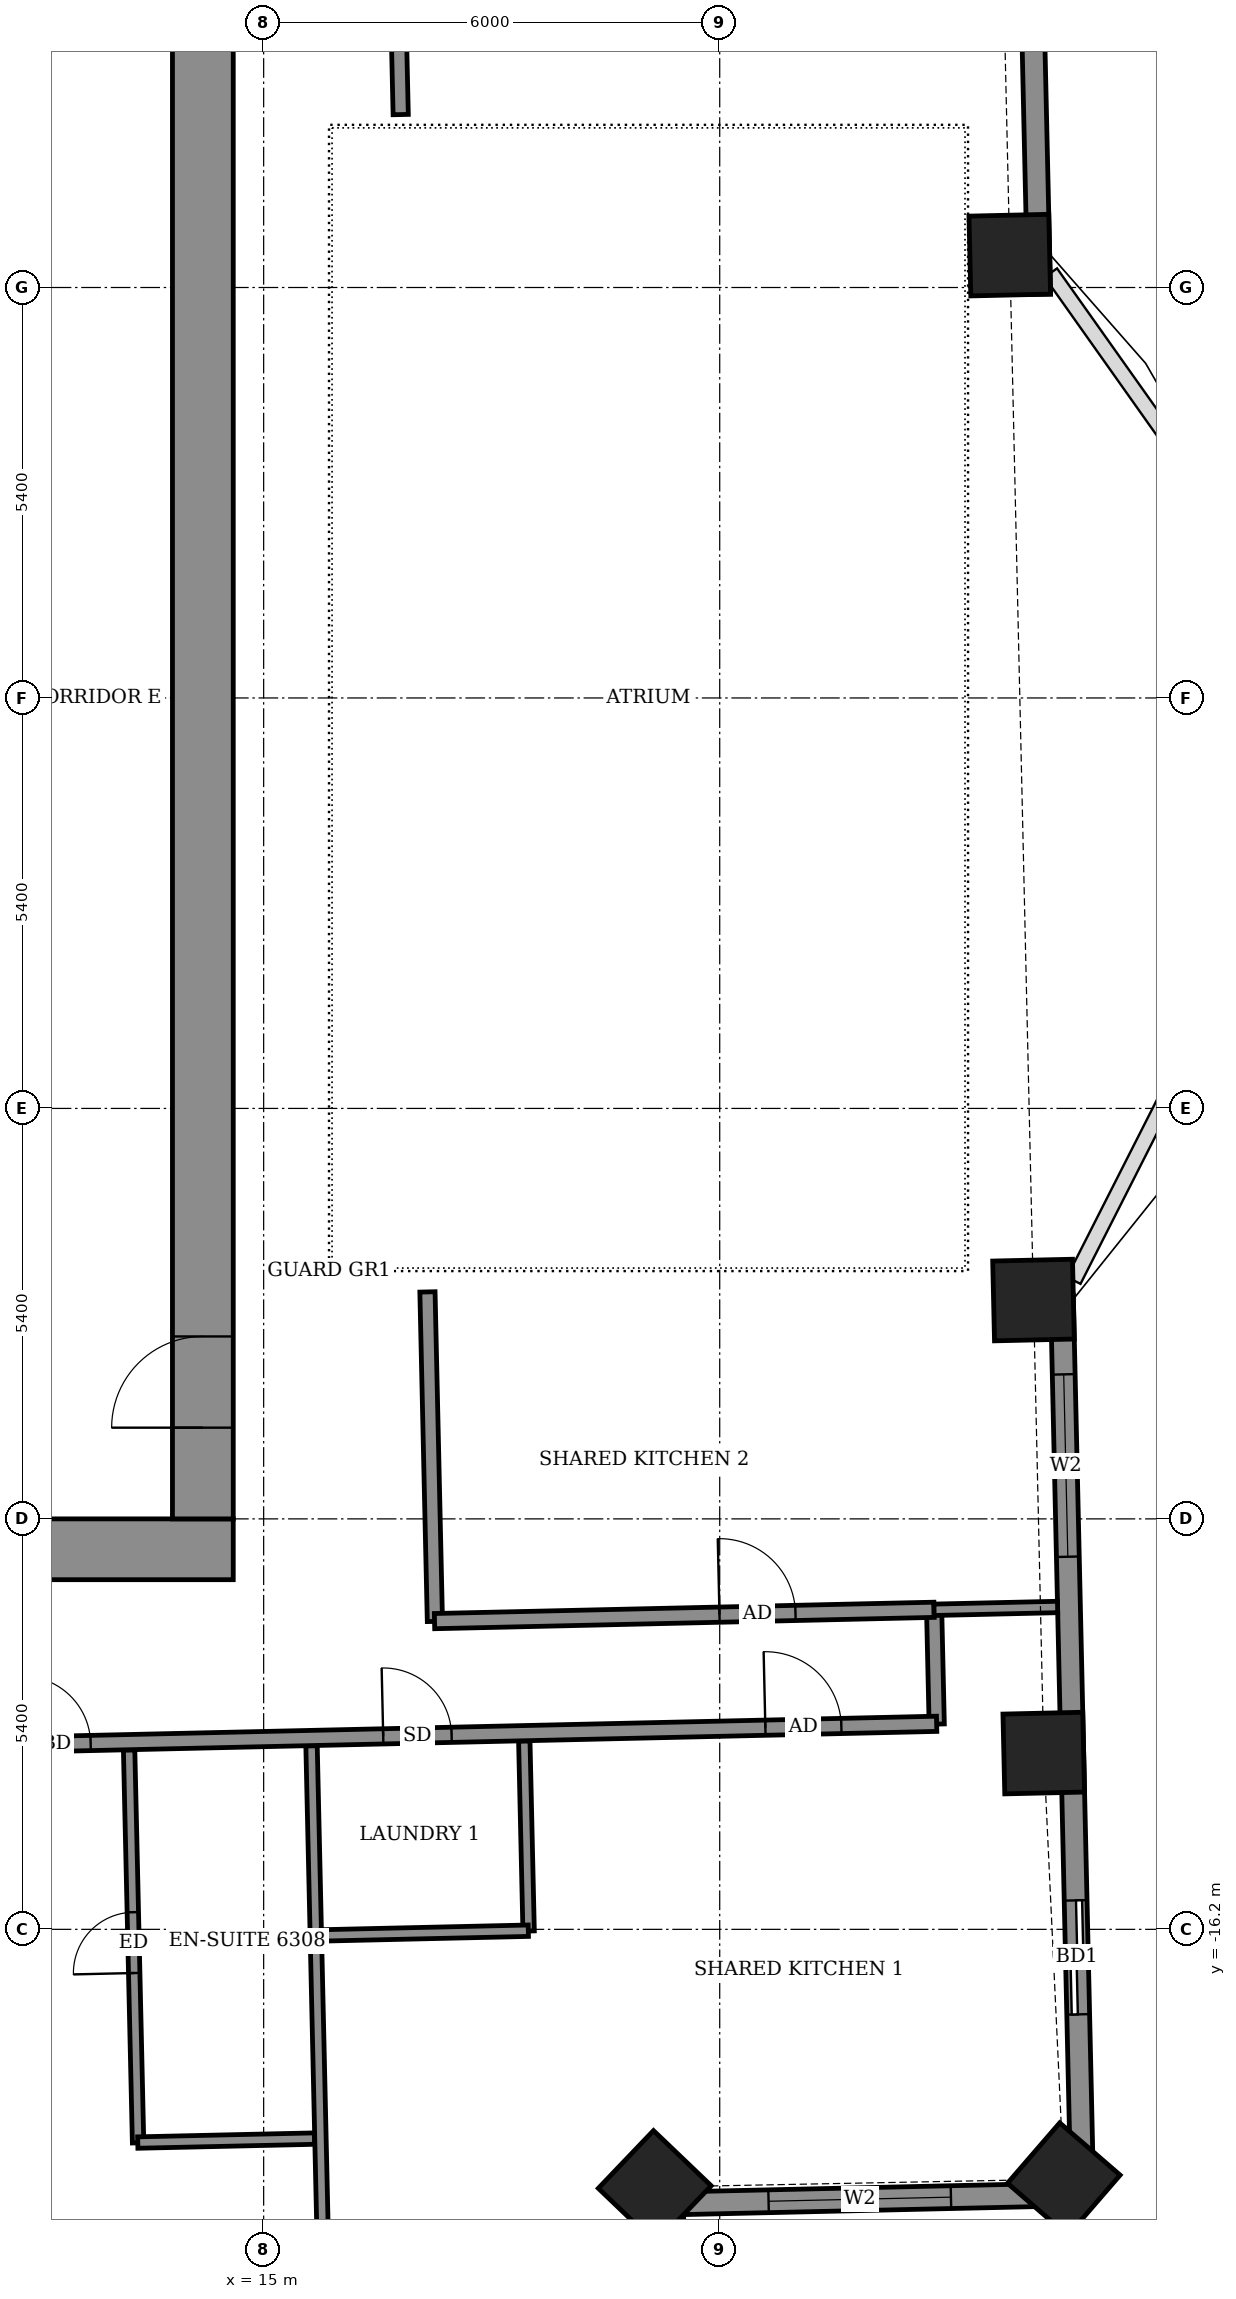
"""IFC4 building model, lengths in metres.
Left out: names, types, materials, properties, quantities, classifications, styles, units other than length and angle.
Written with IfcOpenShell. Run it as: python <this file> out.ifc"""

import sys

from ifc_helpers import new_model, si_unit, direction, frame, frame_2d, origin, origin_2d, place, context, subcontext, project, spatial, rectangle, extrude, element, fill, save


model = new_model("IFC4")
c1 = context("Model", 3, precision=1e-05, world=origin(), true_north=direction((0.0, 1.0)))
c2 = subcontext(c1, "Body", "Model", "MODEL_VIEW")
j1 = project(units=[si_unit("LENGTHUNIT", "METRE"), si_unit("PLANEANGLEUNIT", "RADIAN")], contexts=[c1])
p1 = place(None, origin())
s1 = spatial("IfcSite", under=j1, at=p1, CompositionType="ELEMENT")
p2 = place(p1, origin())
s2 = spatial("IfcBuilding", under=s1, at=p2, CompositionType="ELEMENT")
p3 = place(p2, frame((0.0, 0.0, 249.1)))
s3 = spatial("IfcBuildingStorey", under=s2, at=p3, CompositionType="ELEMENT", Elevation=249.1)
for number, where, z_axis, x_axis in (
    (1, (20.146, -19.59, -0.55), (0.0, 0.0, 1.0), (0.691, 0.723, 0.0)),
    (2, (25.527, -19.487, -0.55), (0.0, 0.0, 1.0), (0.654, 0.756, 0.0)),
    (3, (25.263, -13.881, -0.55), (0.0, 0.0, 1.0), (-0.023, 1.0, 0.0)),
    (4, (25.128, -7.921, -0.55), (0.0, 0.0, 1.0), (-0.023, 1.0, 0.0)),
    (5, (24.816, 5.826, -0.55), (0.0, 0.0, 1.0), (-0.023, 1.0, 0.0)),
):
    element("IfcColumn", number, at=place(p3, frame(where, z_axis=z_axis, x_axis=x_axis)), inside=s3, PredefinedType="COLUMN", context=c2, shape_type="SweptSolid", body=[
        extrude(rectangle(XDim=1.05, YDim=1.05, at=origin_2d()), origin(), (0.0, 0.0, 1.0), 3.6),
    ])
p4 = place(p3, frame((25.77, -19.684, 0.0), z_axis=(0.0, 0.0, 1.0), x_axis=(-0.022659525999, 0.999743239978, 0.0)))
e6 = element("IfcWall", 6, at=p4, inside=s3, PredefinedType="SOLIDWALL", context=c2, shape_type="SweptSolid", body=[
    extrude(rectangle(XDim=11.83, YDim=0.3, at=frame_2d((5.915, 0.0))), origin(), (0.0, 0.0, 1.0), 2.55),
])
p5 = place(p4, frame((2.366, 0.0, 0.0)))
e7 = element("IfcOpeningElement", 7, at=p5, cuts=e6, PredefinedType="OPENING", context=c2, shape_type="SweptSolid", body=[
    extrude(rectangle(XDim=1.5, YDim=2.4, at=frame_2d((0.75, 1.2))), frame((0.0, 0.16, 0.0), z_axis=(0.0, -1.0, 0.0), x_axis=(1.0, 0.0, 0.0)), (0.0, 0.0, 1.0), 0.32),
])
p6 = place(p4, frame((8.388, 0.0, 0.9)))
e8 = element("IfcOpeningElement", 8, at=p6, cuts=e6, PredefinedType="OPENING", context=c2, shape_type="SweptSolid", body=[
    extrude(rectangle(XDim=2.4, YDim=1.5, at=frame_2d((1.2, 0.75))), frame((0.0, 0.16, 0.0), z_axis=(0.0, -1.0, 0.0), x_axis=(1.0, 0.0, 0.0)), (0.0, 0.0, 1.0), 0.32),
])
p7 = place(p3, frame((25.203, 5.31, 0.0), z_axis=(0.0, 0.0, 1.0), x_axis=(-0.022708061432, 0.999742138727, 0.0)))
e9 = element("IfcWall", 9, at=p7, inside=s3, PredefinedType="SOLIDWALL", context=c2, shape_type="SweptSolid", body=[
    extrude(rectangle(XDim=13.299, YDim=0.3, at=frame_2d((6.65, 0.0))), origin(), (0.0, 0.0, 1.0), 2.55),
])
p8 = place(p7, frame((3.986, 0.0, 0.0)))
e10 = element("IfcOpeningElement", 10, at=p8, cuts=e9, PredefinedType="OPENING", context=c2, shape_type="SweptSolid", body=[
    extrude(rectangle(XDim=1.5, YDim=2.4, at=frame_2d((0.75, 1.2))), frame((0.0, 0.16, 0.0), z_axis=(0.0, -1.0, 0.0), x_axis=(1.0, 0.0, 0.0)), (0.0, 0.0, 1.0), 0.32),
])
p9 = place(p7, frame((9.013, 0.0, 0.9)))
e11 = element("IfcOpeningElement", 11, at=p9, cuts=e9, PredefinedType="OPENING", context=c2, shape_type="SweptSolid", body=[
    extrude(rectangle(XDim=2.4, YDim=1.5, at=frame_2d((1.2, 0.75))), frame((0.0, 0.16, 0.0), z_axis=(0.0, -1.0, 0.0), x_axis=(1.0, 0.0, 0.0)), (0.0, 0.0, 1.0), 0.32),
])
p10 = place(p3, frame((20.494, -25.205, 0.0), z_axis=(0.0, 0.0, 1.0), x_axis=(-0.022675486817, 0.999742878093, 0.0)))
e12 = element("IfcWall", 12, at=p10, inside=s3, PredefinedType="SOLIDWALL", context=c2, shape_type="SweptSolid", body=[
    extrude(rectangle(XDim=5.556, YDim=0.3, at=frame_2d((2.778, 0.0))), origin(), (0.0, 0.0, 1.0), 2.55),
])
p11 = place(p10, frame((1.743, 0.0, 0.9)))
e13 = element("IfcOpeningElement", 13, at=p11, cuts=e12, PredefinedType="OPENING", context=c2, shape_type="SweptSolid", body=[
    extrude(rectangle(XDim=2.4, YDim=1.5, at=frame_2d((1.2, 0.75))), frame((0.0, 0.16, 0.0), z_axis=(0.0, -1.0, 0.0), x_axis=(1.0, 0.0, 0.0)), (0.0, 0.0, 1.0), 0.32),
])
p12 = place(p3, frame((20.372, -19.806, 0.0), z_axis=(0.0, 0.0, 1.0), x_axis=(0.999745417973, 0.02256322766, 0.0)))
e14 = element("IfcWall", 14, at=p12, inside=s3, PredefinedType="SOLIDWALL", context=c2, shape_type="SweptSolid", body=[
    extrude(rectangle(XDim=5.399, YDim=0.3, at=frame_2d((2.7, 0.0))), origin(), (0.0, 0.0, 1.0), 2.55),
])
p13 = place(p12, frame((1.271, 0.0, 0.9)))
e15 = element("IfcOpeningElement", 15, at=p13, cuts=e14, PredefinedType="OPENING", context=c2, shape_type="SweptSolid", body=[
    extrude(rectangle(XDim=2.4, YDim=1.5, at=frame_2d((1.2, 0.75))), frame((0.0, 0.16, 0.0), z_axis=(0.0, -1.0, 0.0), x_axis=(1.0, 0.0, 0.0)), (0.0, 0.0, 1.0), 0.32),
])
p14 = place(p3, frame((15.888, -25.159, 0.0), z_axis=(0.0, 0.0, 1.0), x_axis=(-0.022684355347, 0.999742676904, 0.0)))
e16 = element("IfcWall", 16, at=p14, inside=s3, PredefinedType="PARTITIONING", context=c2, shape_type="SweptSolid", body=[
    extrude(rectangle(XDim=11.376, YDim=0.15, at=frame_2d((5.688, 0.0))), origin(), (0.0, 0.0, 1.0), 2.55),
])
p15 = place(p3, frame((13.348, -19.009, 0.0), z_axis=(0.0, 0.0, 1.0), x_axis=(-0.022811522835, 0.999739783357, 0.0)))
e17 = element("IfcWall", 17, at=p15, inside=s3, PredefinedType="PARTITIONING", context=c2, shape_type="SweptSolid", body=[
    extrude(rectangle(XDim=5.169, YDim=0.15, at=frame_2d((2.585, 0.0))), origin(), (0.0, 0.0, 1.0), 3.05),
])
p16 = place(p15, frame((2.235, 0.0, 0.0)))
e18 = element("IfcOpeningElement", 18, at=p16, cuts=e17, PredefinedType="OPENING", context=c2, shape_type="SweptSolid", body=[
    extrude(rectangle(XDim=0.8, YDim=2.1, at=frame_2d((0.4, 1.05))), frame((0.0, 0.085, 0.0), z_axis=(0.0, -1.0, 0.0), x_axis=(1.0, 0.0, 0.0)), (0.0, 0.0, 1.0), 0.17),
])
p17 = place(p3, frame((13.344, -19.005, 0.0), z_axis=(0.0, 0.0, 1.0), x_axis=(0.999749744571, 0.022370700241, 0.0)))
e19 = element("IfcWall", 19, at=p17, inside=s3, PredefinedType="PARTITIONING", context=c2, shape_type="SweptSolid", body=[
    extrude(rectangle(XDim=2.324, YDim=0.15, at=frame_2d((1.162, 0.0))), origin(), (0.0, 0.0, 1.0), 3.05),
])
p18 = place(p3, frame((18.486, -16.222, 0.0), z_axis=(0.0, 0.0, 1.0), x_axis=(-0.022854521249, 0.999738801317, 0.0)))
e20 = element("IfcWall", 20, at=p18, inside=s3, PredefinedType="PARTITIONING", context=c2, shape_type="SweptSolid", body=[
    extrude(rectangle(XDim=2.5, YDim=0.15, at=frame_2d((1.25, 0.0))), origin(), (0.0, 0.0, 1.0), 3.05),
])
p19 = place(p3, frame((15.757, -16.28, 0.0), z_axis=(0.0, 0.0, 1.0), x_axis=(0.99974114142, 0.022751926344, 0.0)))
e21 = element("IfcWall", 21, at=p19, inside=s3, PredefinedType="PARTITIONING", context=c2, shape_type="SweptSolid", body=[
    extrude(rectangle(XDim=2.726, YDim=0.15, at=frame_2d((1.363, 0.0))), origin(), (0.0, 0.0, 1.0), 3.05),
])
p20 = place(p3, frame((23.855, -13.5, 0.0), z_axis=(0.0, 0.0, 1.0), x_axis=(-0.022617910375, 0.999744182344, 0.0)))
e22 = element("IfcWall", 22, at=p20, inside=s3, PredefinedType="PARTITIONING", context=c2, shape_type="SweptSolid", body=[
    extrude(rectangle(XDim=1.5, YDim=0.2, at=frame_2d((0.75, 0.0))), origin(), (0.0, 0.0, 1.0), 3.05),
])
p21 = place(p3, frame((-27.016, -14.65, 0.0), z_axis=(0.0, 0.0, 1.0), x_axis=(0.999742874861, 0.022675629315, 0.0)))
e23 = element("IfcWall", 23, at=p21, inside=s3, PredefinedType="PARTITIONING", context=c2, shape_type="SweptSolid", body=[
    extrude(rectangle(XDim=50.883, YDim=0.2, at=frame_2d((25.442, 0.0))), origin(), (0.0, 0.0, 1.0), 3.05),
])
p22 = place(p21, frame((1.575, 0.0, 0.0)))
e24 = element("IfcOpeningElement", 24, at=p22, cuts=e23, PredefinedType="OPENING", context=c2, shape_type="SweptSolid", body=[
    extrude(rectangle(XDim=1.0, YDim=2.1, at=frame_2d((0.5, 1.05))), frame((0.0, 0.11, 0.0), z_axis=(0.0, -1.0, 0.0), x_axis=(1.0, 0.0, 0.0)), (0.0, 0.0, 1.0), 0.22),
])
p23 = place(p21, frame((6.4, 0.0, 0.0)))
e25 = element("IfcOpeningElement", 25, at=p23, cuts=e23, PredefinedType="OPENING", context=c2, shape_type="SweptSolid", body=[
    extrude(rectangle(XDim=0.9, YDim=2.1, at=frame_2d((0.45, 1.05))), frame((0.0, 0.11, 0.0), z_axis=(0.0, -1.0, 0.0), x_axis=(1.0, 0.0, 0.0)), (0.0, 0.0, 1.0), 0.22),
])
p24 = place(p21, frame((11.025, 0.0, 0.0)))
e26 = element("IfcOpeningElement", 26, at=p24, cuts=e23, PredefinedType="OPENING", context=c2, shape_type="SweptSolid", body=[
    extrude(rectangle(XDim=0.9, YDim=2.1, at=frame_2d((0.45, 1.05))), frame((0.0, 0.11, 0.0), z_axis=(0.0, -1.0, 0.0), x_axis=(1.0, 0.0, 0.0)), (0.0, 0.0, 1.0), 0.22),
])
p25 = place(p21, frame((12.925, 0.0, 0.0)))
e27 = element("IfcOpeningElement", 27, at=p25, cuts=e23, PredefinedType="OPENING", context=c2, shape_type="SweptSolid", body=[
    extrude(rectangle(XDim=0.9, YDim=2.1, at=frame_2d((0.45, 1.05))), frame((0.0, 0.11, 0.0), z_axis=(0.0, -1.0, 0.0), x_axis=(1.0, 0.0, 0.0)), (0.0, 0.0, 1.0), 0.22),
])
p26 = place(p21, frame((19.65, 0.0, 0.0)))
e28 = element("IfcOpeningElement", 28, at=p26, cuts=e23, PredefinedType="OPENING", context=c2, shape_type="SweptSolid", body=[
    extrude(rectangle(XDim=0.9, YDim=2.1, at=frame_2d((0.45, 1.05))), frame((0.0, 0.11, 0.0), z_axis=(0.0, -1.0, 0.0), x_axis=(1.0, 0.0, 0.0)), (0.0, 0.0, 1.0), 0.22),
])
p27 = place(p21, frame((21.575, 0.0, 0.0)))
e29 = element("IfcOpeningElement", 29, at=p27, cuts=e23, PredefinedType="OPENING", context=c2, shape_type="SweptSolid", body=[
    extrude(rectangle(XDim=0.9, YDim=2.1, at=frame_2d((0.45, 1.05))), frame((0.0, 0.11, 0.0), z_axis=(0.0, -1.0, 0.0), x_axis=(1.0, 0.0, 0.0)), (0.0, 0.0, 1.0), 0.22),
])
p28 = place(p21, frame((28.25, 0.0, 0.0)))
e30 = element("IfcOpeningElement", 30, at=p28, cuts=e23, PredefinedType="OPENING", context=c2, shape_type="SweptSolid", body=[
    extrude(rectangle(XDim=0.9, YDim=2.1, at=frame_2d((0.45, 1.05))), frame((0.0, 0.11, 0.0), z_axis=(0.0, -1.0, 0.0), x_axis=(1.0, 0.0, 0.0)), (0.0, 0.0, 1.0), 0.22),
])
p29 = place(p21, frame((30.125, 0.0, 0.0)))
e31 = element("IfcOpeningElement", 31, at=p29, cuts=e23, PredefinedType="OPENING", context=c2, shape_type="SweptSolid", body=[
    extrude(rectangle(XDim=0.9, YDim=2.1, at=frame_2d((0.45, 1.05))), frame((0.0, 0.11, 0.0), z_axis=(0.0, -1.0, 0.0), x_axis=(1.0, 0.0, 0.0)), (0.0, 0.0, 1.0), 0.22),
])
p30 = place(p21, frame((36.9, 0.0, 0.0)))
e32 = element("IfcOpeningElement", 32, at=p30, cuts=e23, PredefinedType="OPENING", context=c2, shape_type="SweptSolid", body=[
    extrude(rectangle(XDim=0.9, YDim=2.1, at=frame_2d((0.45, 1.05))), frame((0.0, 0.11, 0.0), z_axis=(0.0, -1.0, 0.0), x_axis=(1.0, 0.0, 0.0)), (0.0, 0.0, 1.0), 0.22),
])
p31 = place(p21, frame((38.85, 0.0, 0.0)))
e33 = element("IfcOpeningElement", 33, at=p31, cuts=e23, PredefinedType="OPENING", context=c2, shape_type="SweptSolid", body=[
    extrude(rectangle(XDim=0.9, YDim=2.1, at=frame_2d((0.45, 1.05))), frame((0.0, 0.11, 0.0), z_axis=(0.0, -1.0, 0.0), x_axis=(1.0, 0.0, 0.0)), (0.0, 0.0, 1.0), 0.22),
])
p32 = place(p21, frame((48.629, 0.0, 0.0)))
e34 = element("IfcOpeningElement", 34, at=p32, cuts=e23, PredefinedType="OPENING", context=c2, shape_type="SweptSolid", body=[
    extrude(rectangle(XDim=1.0, YDim=2.1, at=frame_2d((0.5, 1.05))), frame((0.0, 0.11, 0.0), z_axis=(0.0, -1.0, 0.0), x_axis=(1.0, 0.0, 0.0)), (0.0, 0.0, 1.0), 0.22),
])
p33 = place(p21, frame((43.6, 0.0, 0.0)))
e35 = element("IfcOpeningElement", 35, at=p33, cuts=e23, PredefinedType="OPENING", context=c2, shape_type="SweptSolid", body=[
    extrude(rectangle(XDim=0.9, YDim=2.1, at=frame_2d((0.45, 1.05))), frame((0.0, 0.11, 0.0), z_axis=(0.0, -1.0, 0.0), x_axis=(1.0, 0.0, 0.0)), (0.0, 0.0, 1.0), 0.22),
])
p34 = place(p3, frame((17.253, -12.149, 0.0), z_axis=(0.0, 0.0, 1.0), x_axis=(-0.022578158225, 0.999745080894, 0.0)))
e36 = element("IfcWall", 36, at=p34, inside=s3, PredefinedType="PARTITIONING", context=c2, shape_type="SweptSolid", body=[
    extrude(rectangle(XDim=4.336, YDim=0.2, at=frame_2d((2.168, 0.0))), origin(), (0.0, 0.0, 1.0), 3.05),
])
p35 = place(p3, frame((17.248, -12.145, 0.0), z_axis=(0.0, 0.0, 1.0), x_axis=(0.999743348025, 0.022654758434, 0.0)))
e37 = element("IfcWall", 37, at=p35, inside=s3, PredefinedType="PARTITIONING", context=c2, shape_type="SweptSolid", body=[
    extrude(rectangle(XDim=6.574, YDim=0.2, at=frame_2d((3.287, 0.0))), origin(), (0.0, 0.0, 1.0), 3.05),
])
p36 = place(p35, frame((3.75, 0.0, 0.0)))
e38 = element("IfcOpeningElement", 38, at=p36, cuts=e37, PredefinedType="OPENING", context=c2, shape_type="SweptSolid", body=[
    extrude(rectangle(XDim=1.0, YDim=2.1, at=frame_2d((0.5, 1.05))), frame((0.0, 0.11, 0.0), z_axis=(0.0, -1.0, 0.0), x_axis=(1.0, 0.0, 0.0)), (0.0, 0.0, 1.0), 0.22),
])
p37 = place(p3, frame((23.82, -11.996, 0.0), z_axis=(0.0, 0.0, 1.0), x_axis=(0.9997393482, 0.022830586077, 0.0)))
e39 = element("IfcWall", 39, at=p37, inside=s3, PredefinedType="PARTITIONING", context=c2, shape_type="SweptSolid", body=[
    extrude(rectangle(XDim=1.625, YDim=0.15, at=frame_2d((0.813, 0.0))), origin(), (0.0, 0.0, 1.0), 2.55),
])
p38 = place(p3, frame((16.803, 7.675, 0.0), z_axis=(0.0, 0.0, 1.0), x_axis=(-0.022667483124, 0.999743059595, 0.0)))
e40 = element("IfcWall", 40, at=p38, inside=s3, PredefinedType="PARTITIONING", context=c2, shape_type="SweptSolid", body=[
    extrude(rectangle(XDim=5.245, YDim=0.2, at=frame_2d((2.623, 0.0))), origin(), (0.0, 0.0, 1.0), 3.05),
])
p39 = place(p3, frame((-14.6, -11.2, 0.0), z_axis=(0.0, 0.0, 1.0), x_axis=(1.0, 0.0, 0.0)))
e41 = element("IfcWall", 41, at=p39, inside=s3, PredefinedType="SHEAR", context=c2, shape_type="SweptSolid", body=[
    extrude(rectangle(XDim=29.2, YDim=0.8, at=frame_2d((14.6, 0.0))), origin(), (0.0, 0.0, 1.0), 3.6),
])
p40 = place(p3, frame((14.2, -10.8, 0.0), z_axis=(0.0, 0.0, 1.0), x_axis=(0.0, 1.0, 0.0)))
e42 = element("IfcWall", 42, at=p40, inside=s3, PredefinedType="SHEAR", context=c2, shape_type="SweptSolid", body=[
    extrude(rectangle(XDim=21.6, YDim=0.8, at=frame_2d((10.8, 0.0))), origin(), (0.0, 0.0, 1.0), 3.6),
])
p41 = place(p40, frame((1.2, 0.0, 0.0)))
e43 = element("IfcOpeningElement", 43, at=p41, cuts=e42, PredefinedType="OPENING", context=c2, shape_type="SweptSolid", body=[
    extrude(rectangle(XDim=1.2, YDim=2.1, at=frame_2d((0.6, 1.05))), frame((0.0, 0.41, 0.0), z_axis=(0.0, -1.0, 0.0), x_axis=(1.0, 0.0, 0.0)), (0.0, 0.0, 1.0), 0.82),
])
p42 = place(p5, origin())
e44 = element("IfcDoor", 44, at=p42, inside=s3, OperationType="SLIDING_TO_LEFT", PredefinedType="DOOR", context=c2, shape_type="SweptSolid", body=[
    extrude(rectangle(XDim=1.5, YDim=2.4, at=frame_2d((0.75, 1.2))), frame((0.0, 0.025, 0.0), z_axis=(0.0, -1.0, 0.0), x_axis=(1.0, 0.0, 0.0)), (0.0, 0.0, 1.0), 0.05),
])
fill(e7, e44)
p43 = place(p6, origin())
e45 = element("IfcWindow", 45, at=p43, inside=s3, PartitioningType="DOUBLE_PANEL_VERTICAL", PredefinedType="WINDOW", context=c2, shape_type="SweptSolid", body=[
    extrude(rectangle(XDim=2.4, YDim=1.5, at=frame_2d((1.2, 0.75))), frame((0.0, 0.03, 0.0), z_axis=(0.0, -1.0, 0.0), x_axis=(1.0, 0.0, 0.0)), (0.0, 0.0, 1.0), 0.06),
])
fill(e8, e45)
p44 = place(p13, origin())
e46 = element("IfcWindow", 46, at=p44, inside=s3, PartitioningType="DOUBLE_PANEL_VERTICAL", PredefinedType="WINDOW", context=c2, shape_type="SweptSolid", body=[
    extrude(rectangle(XDim=2.4, YDim=1.5, at=frame_2d((1.2, 0.75))), frame((0.0, 0.03, 0.0), z_axis=(0.0, -1.0, 0.0), x_axis=(1.0, 0.0, 0.0)), (0.0, 0.0, 1.0), 0.06),
])
fill(e15, e46)
p45 = place(p31, origin())
e47 = element("IfcDoor", 47, at=p45, inside=s3, OperationType="SINGLE_SWING_RIGHT", PredefinedType="DOOR", context=c2, shape_type="SweptSolid", body=[
    extrude(rectangle(XDim=0.9, YDim=2.1, at=frame_2d((0.45, 1.05))), frame((0.0, 0.025, 0.0), z_axis=(0.0, -1.0, 0.0), x_axis=(1.0, 0.0, 0.0)), (0.0, 0.0, 1.0), 0.05),
])
fill(e33, e47)
p46 = place(p16, origin())
e48 = element("IfcDoor", 48, at=p46, inside=s3, OperationType="SINGLE_SWING_RIGHT", PredefinedType="DOOR", context=c2, shape_type="SweptSolid", body=[
    extrude(rectangle(XDim=0.8, YDim=2.1, at=frame_2d((0.4, 1.05))), frame((0.0, 0.025, 0.0), z_axis=(0.0, -1.0, 0.0), x_axis=(1.0, 0.0, 0.0)), (0.0, 0.0, 1.0), 0.05),
])
fill(e18, e48)
p47 = place(p32, origin())
e49 = element("IfcDoor", 49, at=p47, inside=s3, OperationType="SINGLE_SWING_RIGHT", PredefinedType="DOOR", context=c2, shape_type="SweptSolid", body=[
    extrude(rectangle(XDim=1.0, YDim=2.1, at=frame_2d((0.5, 1.05))), frame((0.0, 0.025, 0.0), z_axis=(0.0, -1.0, 0.0), x_axis=(1.0, 0.0, 0.0)), (0.0, 0.0, 1.0), 0.05),
])
fill(e34, e49)
p48 = place(p33, origin())
e50 = element("IfcDoor", 50, at=p48, inside=s3, OperationType="SINGLE_SWING_RIGHT", PredefinedType="DOOR", context=c2, shape_type="SweptSolid", body=[
    extrude(rectangle(XDim=0.9, YDim=2.1, at=frame_2d((0.45, 1.05))), frame((0.0, 0.025, 0.0), z_axis=(0.0, -1.0, 0.0), x_axis=(1.0, 0.0, 0.0)), (0.0, 0.0, 1.0), 0.05),
])
fill(e35, e50)
p49 = place(p36, origin())
e51 = element("IfcDoor", 51, at=p49, inside=s3, OperationType="SINGLE_SWING_LEFT", PredefinedType="DOOR", context=c2, shape_type="SweptSolid", body=[
    extrude(rectangle(XDim=1.0, YDim=2.1, at=frame_2d((0.5, 1.05))), frame((0.0, 0.025, 0.0), z_axis=(0.0, -1.0, 0.0), x_axis=(1.0, 0.0, 0.0)), (0.0, 0.0, 1.0), 0.05),
])
fill(e38, e51)
p50 = place(p41, origin())
e52 = element("IfcDoor", 52, at=p50, inside=s3, OperationType="DOUBLE_DOOR_SINGLE_SWING", PredefinedType="DOOR", context=c2, shape_type="SweptSolid", body=[
    extrude(rectangle(XDim=1.2, YDim=2.1, at=frame_2d((0.6, 1.05))), frame((0.0, 0.025, 0.0), z_axis=(0.0, -1.0, 0.0), x_axis=(1.0, 0.0, 0.0)), (0.0, 0.0, 1.0), 0.05),
])
fill(e43, e52)
save(model, sys.argv[1])
